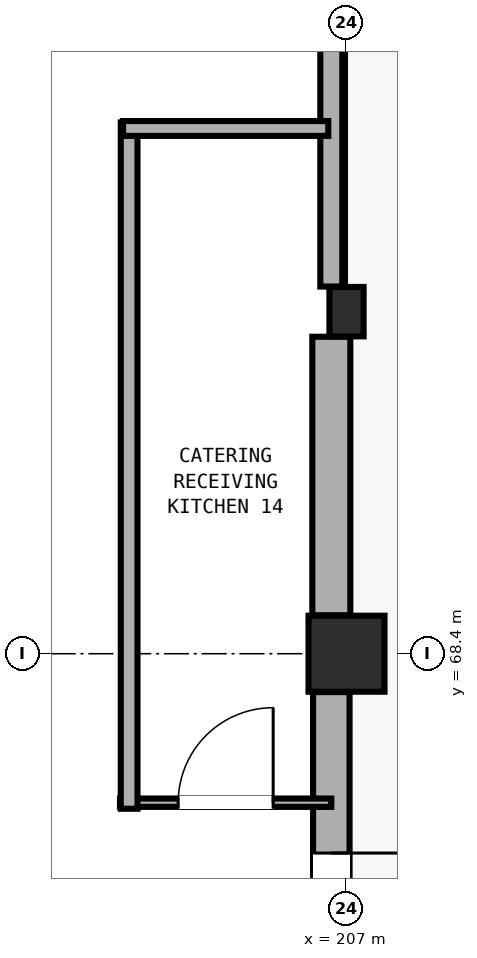
"""IFC4 building model, lengths in metres.
Left out: names, types, materials, properties, quantities, classifications, styles, units other than length and angle.
Written with IfcOpenShell. Run it as: python <this file> out.ifc"""

import sys

from ifc_helpers import new_model, si_unit, direction, frame, frame_2d, origin, origin_2d, place, context, subcontext, project, spatial, rectangle, extrude, element, fill, save


model = new_model("IFC4")
c1 = context("Model", 3, precision=1e-05, world=origin(), true_north=direction((0.0, 1.0)))
c2 = subcontext(c1, "Body", "Model", "MODEL_VIEW")
j1 = project(units=[si_unit("LENGTHUNIT", "METRE"), si_unit("PLANEANGLEUNIT", "RADIAN")], contexts=[c1])
p1 = place(None, origin())
s1 = spatial("IfcSite", under=j1, at=p1, CompositionType="ELEMENT")
p2 = place(p1, origin())
s2 = spatial("IfcBuilding", under=s1, at=p2, CompositionType="ELEMENT")
p3 = place(p2, origin())
s3 = spatial("IfcBuildingStorey", under=s2, at=p3, CompositionType="ELEMENT", Elevation=0.0)
p4 = place(p3, frame((207.0, 68.4, 0.0), z_axis=(0.0, 0.0, 1.0), x_axis=(1.0, 0.0, 0.0)))
e1 = element("IfcColumn", 1, at=p4, inside=s3, PredefinedType="COLUMN", context=c2, shape_type="SweptSolid", body=[
    extrude(rectangle(XDim=1.0, YDim=1.0, at=origin_2d()), origin(), (0.0, 0.0, 1.0), 4.8),
])
p5 = place(p3, frame((207.0, 72.9, 0.0), z_axis=(0.0, 0.0, 1.0), x_axis=(1.0, 0.0, 0.0)))
e2 = element("IfcColumn", 2, at=p5, inside=s3, PredefinedType="PILASTER", context=c2, shape_type="SweptSolid", body=[
    extrude(rectangle(XDim=0.45, YDim=0.65, at=origin_2d()), origin(), (0.0, 0.0, 1.0), 4.8),
])
p6 = place(p3, frame((206.8, 76.895, 0.0), z_axis=(0.0, 0.0, 1.0), x_axis=(0.0, -1.0, 0.0)))
e3 = element("IfcWall", 3, at=p6, inside=s3, PredefinedType="SOLIDWALL", context=c2, shape_type="SweptSolid", body=[
    extrude(rectangle(XDim=3.665, YDim=0.29, at=frame_2d((1.833, 0.0))), origin(), (0.0, 0.0, 1.0), 3.58),
])
p7 = place(p3, frame((206.8, 72.57, 0.0), z_axis=(0.0, 0.0, 1.0), x_axis=(0.0, -1.0, 0.0)))
e4 = element("IfcWall", 4, at=p7, inside=s3, PredefinedType="SOLIDWALL", context=c2, shape_type="SweptSolid", body=[
    extrude(rectangle(XDim=3.665, YDim=0.5, at=frame_2d((1.833, 0.0))), origin(), (0.0, 0.0, 1.0), 3.58),
])
p8 = place(p3, frame((206.8, 67.895, 0.0), z_axis=(0.0, 0.0, 1.0), x_axis=(0.0, -1.0, 0.0)))
e5 = element("IfcWall", 5, at=p8, inside=s3, PredefinedType="SOLIDWALL", context=c2, shape_type="SweptSolid", body=[
    extrude(rectangle(XDim=6.19, YDim=0.48, at=frame_2d((3.095, 0.0))), origin(), (0.0, 0.0, 1.0), 3.58),
])
p9 = place(p8, frame((2.117, 0.0, 0.0)))
e6 = element("IfcOpeningElement", 6, at=p9, cuts=e5, PredefinedType="OPENING", context=c2, shape_type="SweptSolid", body=[
    extrude(rectangle(XDim=3.3, YDim=2.55, at=frame_2d((1.65, 1.275))), frame((0.0, 0.25, 0.0), z_axis=(0.0, -1.0, 0.0), x_axis=(1.0, 0.0, 0.0)), (0.0, 0.0, 1.0), 0.5),
])
p10 = place(p3, frame((204.02, 66.44, 0.0), z_axis=(0.0, 0.0, 1.0), x_axis=(1.0, 0.0, 0.0)))
e7 = element("IfcWall", 7, at=p10, inside=s3, PredefinedType="PARTITIONING", context=c2, shape_type="SweptSolid", body=[
    extrude(rectangle(XDim=2.78, YDim=0.11, at=frame_2d((1.39, 0.0))), origin(), (0.0, 0.0, 1.0), 3.28),
])
p11 = place(p10, frame((0.765, 0.0, 0.0)))
e8 = element("IfcOpeningElement", 8, at=p11, cuts=e7, PredefinedType="OPENING", context=c2, shape_type="SweptSolid", body=[
    extrude(rectangle(XDim=1.25, YDim=2.15, at=frame_2d((0.625, 1.075))), frame((0.0, 0.065, 0.0), z_axis=(0.0, -1.0, 0.0), x_axis=(1.0, 0.0, 0.0)), (0.0, 0.0, 1.0), 0.13),
])
p12 = place(p3, frame((204.14, 66.36, 0.0), z_axis=(0.0, 0.0, 1.0), x_axis=(0.0, 1.0, 0.0)))
e9 = element("IfcWall", 9, at=p12, inside=s3, PredefinedType="PARTITIONING", context=c2, shape_type="SweptSolid", body=[
    extrude(rectangle(XDim=9.03, YDim=0.22, at=frame_2d((4.515, 0.0))), origin(), (0.0, 0.0, 1.0), 3.28),
])
p13 = place(p3, frame((204.06, 75.31, 0.0), z_axis=(0.0, 0.0, 1.0), x_axis=(1.0, 0.0, 0.0)))
e10 = element("IfcWall", 10, at=p13, inside=s3, PredefinedType="PARTITIONING", context=c2, shape_type="SweptSolid", body=[
    extrude(rectangle(XDim=2.7, YDim=0.195, at=frame_2d((1.35, 0.0))), origin(), (0.0, 0.0, 1.0), 3.28),
])
p14 = place(p9, origin())
e11 = element("IfcDoor", 11, at=p14, inside=s3, OperationType="DOUBLE_DOOR_SINGLE_SWING", PredefinedType="DOOR", context=c2, shape_type="SweptSolid", body=[
    extrude(rectangle(XDim=3.3, YDim=2.55, at=frame_2d((1.65, 1.275))), frame((0.0, 0.025, 0.0), z_axis=(0.0, -1.0, 0.0), x_axis=(1.0, 0.0, 0.0)), (0.0, 0.0, 1.0), 0.05),
])
fill(e6, e11)
p15 = place(p11, origin())
e12 = element("IfcDoor", 12, at=p15, inside=s3, OperationType="SINGLE_SWING_RIGHT", PredefinedType="DOOR", context=c2, shape_type="SweptSolid", body=[
    extrude(rectangle(XDim=1.25, YDim=2.15, at=frame_2d((0.625, 1.075))), frame((0.0, 0.025, 0.0), z_axis=(0.0, -1.0, 0.0), x_axis=(1.0, 0.0, 0.0)), (0.0, 0.0, 1.0), 0.05),
])
fill(e8, e12)
save(model, sys.argv[1])
